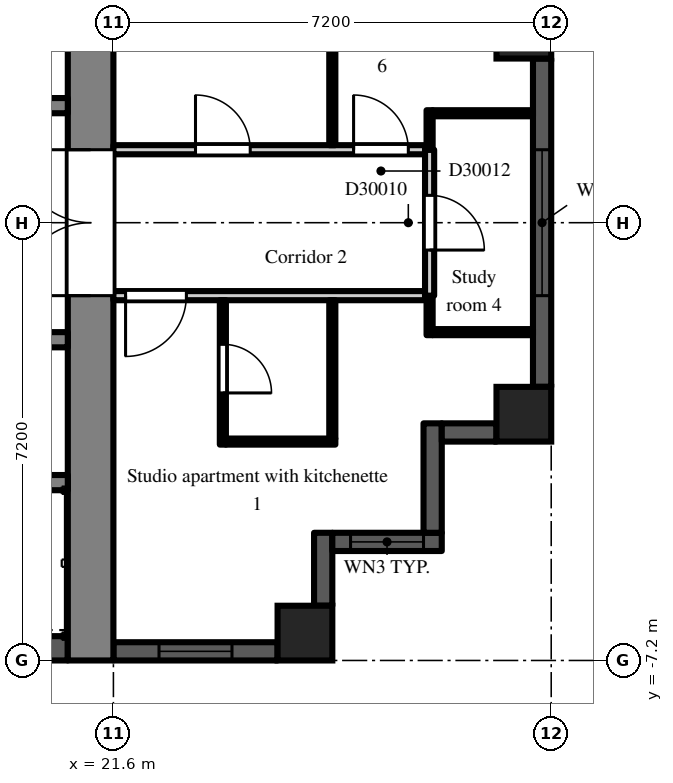
"""IFC4 building model, lengths in metres.
Left out: names, types, materials, properties, quantities, classifications, styles, units other than length and angle.
Written with IfcOpenShell. Run it as: python <this file> out.ifc"""

import sys

from ifc_helpers import new_model, si_unit, direction, frame, frame_2d, origin, origin_2d, place, context, subcontext, project, spatial, rectangle, extrude, element, fill, save


model = new_model("IFC4")
c1 = context("Model", 3, precision=1e-05, world=origin(), true_north=direction((0.0, 1.0)))
c2 = subcontext(c1, "Body", "Model", "MODEL_VIEW")
j1 = project(units=[si_unit("LENGTHUNIT", "METRE"), si_unit("PLANEANGLEUNIT", "RADIAN")], contexts=[c1])
p1 = place(None, origin())
s1 = spatial("IfcSite", under=j1, at=p1, CompositionType="ELEMENT")
p2 = place(p1, origin())
s2 = spatial("IfcBuilding", under=s1, at=p2, CompositionType="ELEMENT")
p3 = place(p2, frame((0.0, 0.0, 207.9)))
s3 = spatial("IfcBuildingStorey", under=s2, at=p3, CompositionType="ELEMENT", Elevation=207.9)
for number, where, z_axis, x_axis in (
    (1, (24.75, -6.75, 0.0), (0.0, 0.0, 1.0), (1.0, 0.0, 0.0)),
    (2, (28.35, -3.15, 0.0), (0.0, 0.0, 1.0), (1.0, 0.0, 0.0)),
    (3, (28.35, 3.15, 0.0), (0.0, 0.0, 1.0), (1.0, 0.0, 0.0)),
):
    element("IfcColumn", number, at=place(p3, frame(where, z_axis=z_axis, x_axis=x_axis)), inside=s3, PredefinedType="COLUMN", context=c2, shape_type="SweptSolid", body=[
        extrude(rectangle(XDim=0.9, YDim=0.9, at=origin_2d()), origin(), (0.0, 0.0, 1.0), 3.0),
    ])
p4 = place(p3, frame((21.6, -7.05, 0.0), z_axis=(0.0, 0.0, 1.0), x_axis=(1.0, 0.0, 0.0)))
e4 = element("IfcWall", 4, at=p4, inside=s3, PredefinedType="SOLIDWALL", context=c2, shape_type="SweptSolid", body=[
    extrude(rectangle(XDim=2.7, YDim=0.3, at=frame_2d((1.35, 0.0))), origin(), (0.0, 0.0, 1.0), 2.3),
])
p5 = place(p4, frame((0.75, 0.0, 0.2)))
e5 = element("IfcOpeningElement", 5, at=p5, cuts=e4, PredefinedType="OPENING", context=c2, shape_type="SweptSolid", body=[
    extrude(rectangle(XDim=1.2, YDim=1.85, at=frame_2d((0.6, 0.925))), frame((0.0, 0.16, 0.0), z_axis=(0.0, -1.0, 0.0), x_axis=(1.0, 0.0, 0.0)), (0.0, 0.0, 1.0), 0.32),
])
p6 = place(p3, frame((25.05, -6.3, 0.0), z_axis=(0.0, 0.0, 1.0), x_axis=(0.0, 1.0, 0.0)))
e6 = element("IfcWall", 6, at=p6, inside=s3, PredefinedType="SOLIDWALL", context=c2, shape_type="SweptSolid", body=[
    extrude(rectangle(XDim=1.2, YDim=0.3, at=frame_2d((0.6, 0.0))), origin(), (0.0, 0.0, 1.0), 2.6),
])
p7 = place(p3, frame((25.2, -5.25, 0.0), z_axis=(0.0, 0.0, 1.0), x_axis=(1.0, 0.0, 0.0)))
e7 = element("IfcWall", 7, at=p7, inside=s3, PredefinedType="SOLIDWALL", context=c2, shape_type="SweptSolid", body=[
    extrude(rectangle(XDim=1.8, YDim=0.3, at=frame_2d((0.9, 0.0))), origin(), (0.0, 0.0, 1.0), 2.6),
])
p8 = place(p7, frame((0.3, 0.0, 0.2)))
e8 = element("IfcOpeningElement", 8, at=p8, cuts=e7, PredefinedType="OPENING", context=c2, shape_type="SweptSolid", body=[
    extrude(rectangle(XDim=1.2, YDim=1.85, at=frame_2d((0.6, 0.925))), frame((0.0, 0.16, 0.0), z_axis=(0.0, -1.0, 0.0), x_axis=(1.0, 0.0, 0.0)), (0.0, 0.0, 1.0), 0.32),
])
p9 = place(p3, frame((26.85, -5.1, 0.0), z_axis=(0.0, 0.0, 1.0), x_axis=(0.0, 1.0, 0.0)))
e9 = element("IfcWall", 9, at=p9, inside=s3, PredefinedType="SOLIDWALL", context=c2, shape_type="SweptSolid", body=[
    extrude(rectangle(XDim=1.8, YDim=0.3, at=frame_2d((0.9, 0.0))), origin(), (0.0, 0.0, 1.0), 2.6),
])
p10 = place(p3, frame((27.0, -3.45, 0.0), z_axis=(0.0, 0.0, 1.0), x_axis=(1.0, 0.0, 0.0)))
e10 = element("IfcWall", 10, at=p10, inside=s3, PredefinedType="SOLIDWALL", context=c2, shape_type="SweptSolid", body=[
    extrude(rectangle(XDim=0.9, YDim=0.3, at=frame_2d((0.45, 0.0))), origin(), (0.0, 0.0, 1.0), 2.6),
])
p11 = place(p3, frame((28.65, -2.7, 0.0), z_axis=(0.0, 0.0, 1.0), x_axis=(0.0, 1.0, 0.0)))
e11 = element("IfcWall", 11, at=p11, inside=s3, PredefinedType="SOLIDWALL", context=c2, shape_type="SweptSolid", body=[
    extrude(rectangle(XDim=5.4, YDim=0.3, at=frame_2d((2.7, 0.0))), origin(), (0.0, 0.0, 1.0), 2.3),
])
p12 = place(p11, frame((1.5, 0.0, 0.2)))
e12 = element("IfcOpeningElement", 12, at=p12, cuts=e11, PredefinedType="OPENING", context=c2, shape_type="SweptSolid", body=[
    extrude(rectangle(XDim=2.4, YDim=1.85, at=frame_2d((1.2, 0.925))), frame((0.0, 0.16, 0.0), z_axis=(0.0, -1.0, 0.0), x_axis=(1.0, 0.0, 0.0)), (0.0, 0.0, 1.0), 0.32),
])
p13 = place(p3, frame((21.225, -7.2, 0.0), z_axis=(0.0, 0.0, 1.0), x_axis=(0.0, 1.0, 0.0)))
e13 = element("IfcWall", 13, at=p13, inside=s3, PredefinedType="SHEAR", context=c2, shape_type="SweptSolid", body=[
    extrude(rectangle(XDim=14.4, YDim=0.75, at=frame_2d((7.2, 0.0))), origin(), (0.0, 0.0, 1.0), 2.6),
])
p14 = place(p13, frame((6.0, 0.0, 0.0)))
e14 = element("IfcOpeningElement", 14, at=p14, cuts=e13, PredefinedType="OPENING", context=c2, shape_type="SweptSolid", body=[
    extrude(rectangle(XDim=2.4, YDim=2.2, at=frame_2d((1.2, 1.1))), frame((0.0, 0.385, 0.0), z_axis=(0.0, -1.0, 0.0), x_axis=(1.0, 0.0, 0.0)), (0.0, 0.0, 1.0), 0.77),
])
p15 = place(p3, frame((7.9, 1.925, 0.0), z_axis=(0.0, 0.0, 1.0), x_axis=(1.0, 0.0, 0.0)))
e15 = element("IfcWall", 15, at=p15, inside=s3, PredefinedType="SHEAR", context=c2, shape_type="SweptSolid", body=[
    extrude(rectangle(XDim=12.95, YDim=0.25, at=frame_2d((6.475, 0.0))), origin(), (0.0, 0.0, 1.0), 2.6),
])
p16 = place(p15, frame((4.825, 0.0, 0.0)))
e16 = element("IfcOpeningElement", 16, at=p16, cuts=e15, PredefinedType="OPENING", context=c2, shape_type="SweptSolid", body=[
    extrude(rectangle(XDim=1.1, YDim=2.1, at=frame_2d((0.55, 1.05))), frame((0.0, 0.135, 0.0), z_axis=(0.0, -1.0, 0.0), x_axis=(1.0, 0.0, 0.0)), (0.0, 0.0, 1.0), 0.27),
])
p17 = place(p15, frame((7.025, 0.0, 0.0)))
e17 = element("IfcOpeningElement", 17, at=p17, cuts=e15, PredefinedType="OPENING", context=c2, shape_type="SweptSolid", body=[
    extrude(rectangle(XDim=1.1, YDim=2.1, at=frame_2d((0.55, 1.05))), frame((0.0, 0.135, 0.0), z_axis=(0.0, -1.0, 0.0), x_axis=(1.0, 0.0, 0.0)), (0.0, 0.0, 1.0), 0.27),
])
p18 = place(p15, frame((9.225, 0.0, 0.0)))
e18 = element("IfcOpeningElement", 18, at=p18, cuts=e15, PredefinedType="OPENING", context=c2, shape_type="SweptSolid", body=[
    extrude(rectangle(XDim=1.1, YDim=2.1, at=frame_2d((0.55, 1.05))), frame((0.0, 0.135, 0.0), z_axis=(0.0, -1.0, 0.0), x_axis=(1.0, 0.0, 0.0)), (0.0, 0.0, 1.0), 0.27),
])
p19 = place(p15, frame((0.525, 0.0, 0.0)))
e19 = element("IfcOpeningElement", 19, at=p19, cuts=e15, PredefinedType="OPENING", context=c2, shape_type="SweptSolid", body=[
    extrude(rectangle(XDim=0.9, YDim=2.1, at=frame_2d((0.45, 1.05))), frame((0.0, 0.135, 0.0), z_axis=(0.0, -1.0, 0.0), x_axis=(1.0, 0.0, 0.0)), (0.0, 0.0, 1.0), 0.27),
])
p20 = place(p15, frame((2.625, 0.0, 0.0)))
e20 = element("IfcOpeningElement", 20, at=p20, cuts=e15, PredefinedType="OPENING", context=c2, shape_type="SweptSolid", body=[
    extrude(rectangle(XDim=1.1, YDim=2.1, at=frame_2d((0.55, 1.05))), frame((0.0, 0.135, 0.0), z_axis=(0.0, -1.0, 0.0), x_axis=(1.0, 0.0, 0.0)), (0.0, 0.0, 1.0), 0.27),
])
p21 = place(p15, frame((11.525, 0.0, 0.0)))
e21 = element("IfcOpeningElement", 21, at=p21, cuts=e15, PredefinedType="OPENING", context=c2, shape_type="SweptSolid", body=[
    extrude(rectangle(XDim=0.9, YDim=2.1, at=frame_2d((0.45, 1.05))), frame((0.0, 0.135, 0.0), z_axis=(0.0, -1.0, 0.0), x_axis=(1.0, 0.0, 0.0)), (0.0, 0.0, 1.0), 0.27),
])
p22 = place(p3, frame((7.9, -7.0, 0.0), z_axis=(0.0, 0.0, 1.0), x_axis=(1.0, 0.0, 0.0)))
e22 = element("IfcWall", 22, at=p22, inside=s3, PredefinedType="SHEAR", context=c2, shape_type="SweptSolid", body=[
    extrude(rectangle(XDim=12.95, YDim=0.4, at=frame_2d((6.475, 0.0))), origin(), (0.0, 0.0, 1.0), 2.6),
])
p23 = place(p3, frame((7.9, -1.925, 0.0), z_axis=(0.0, 0.0, 1.0), x_axis=(1.0, 0.0, 0.0)))
e23 = element("IfcWall", 23, at=p23, inside=s3, PredefinedType="SHEAR", context=c2, shape_type="SweptSolid", body=[
    extrude(rectangle(XDim=12.95, YDim=0.25, at=frame_2d((6.475, 0.0))), origin(), (0.0, 0.0, 1.0), 2.6),
])
p24 = place(p23, frame((0.525, 0.0, 0.0)))
e24 = element("IfcOpeningElement", 24, at=p24, cuts=e23, PredefinedType="OPENING", context=c2, shape_type="SweptSolid", body=[
    extrude(rectangle(XDim=0.9, YDim=2.1, at=frame_2d((0.45, 1.05))), frame((0.0, 0.135, 0.0), z_axis=(0.0, -1.0, 0.0), x_axis=(1.0, 0.0, 0.0)), (0.0, 0.0, 1.0), 0.27),
])
p25 = place(p23, frame((2.625, 0.0, 0.0)))
e25 = element("IfcOpeningElement", 25, at=p25, cuts=e23, PredefinedType="OPENING", context=c2, shape_type="SweptSolid", body=[
    extrude(rectangle(XDim=1.1, YDim=2.1, at=frame_2d((0.55, 1.05))), frame((0.0, 0.135, 0.0), z_axis=(0.0, -1.0, 0.0), x_axis=(1.0, 0.0, 0.0)), (0.0, 0.0, 1.0), 0.27),
])
p26 = place(p23, frame((4.925, 0.0, 0.0)))
e26 = element("IfcOpeningElement", 26, at=p26, cuts=e23, PredefinedType="OPENING", context=c2, shape_type="SweptSolid", body=[
    extrude(rectangle(XDim=0.9, YDim=2.1, at=frame_2d((0.45, 1.05))), frame((0.0, 0.135, 0.0), z_axis=(0.0, -1.0, 0.0), x_axis=(1.0, 0.0, 0.0)), (0.0, 0.0, 1.0), 0.27),
])
p27 = place(p23, frame((8.225, 0.0, 0.0)))
e27 = element("IfcOpeningElement", 27, at=p27, cuts=e23, PredefinedType="OPENING", context=c2, shape_type="SweptSolid", body=[
    extrude(rectangle(XDim=0.9, YDim=2.1, at=frame_2d((0.45, 1.05))), frame((0.0, 0.135, 0.0), z_axis=(0.0, -1.0, 0.0), x_axis=(1.0, 0.0, 0.0)), (0.0, 0.0, 1.0), 0.27),
])
p28 = place(p23, frame((11.525, 0.0, 0.0)))
e28 = element("IfcOpeningElement", 28, at=p28, cuts=e23, PredefinedType="OPENING", context=c2, shape_type="SweptSolid", body=[
    extrude(rectangle(XDim=0.9, YDim=2.1, at=frame_2d((0.45, 1.05))), frame((0.0, 0.135, 0.0), z_axis=(0.0, -1.0, 0.0), x_axis=(1.0, 0.0, 0.0)), (0.0, 0.0, 1.0), 0.27),
])
p29 = place(p3, frame((12.3, -4.275, 0.0), z_axis=(0.0, 0.0, 1.0), x_axis=(1.0, 0.0, 0.0)))
e29 = element("IfcWall", 29, at=p29, inside=s3, PredefinedType="SHEAR", context=c2, shape_type="SweptSolid", body=[
    extrude(rectangle(XDim=8.55, YDim=0.25, at=frame_2d((4.275, 0.0))), origin(), (0.0, 0.0, 1.0), 2.6),
])
p30 = place(p3, frame((21.6, -1.2, 0.0), z_axis=(0.0, 0.0, 1.0), x_axis=(1.0, 0.0, 0.0)))
e30 = element("IfcWall", 30, at=p30, inside=s3, PredefinedType="PARTITIONING", context=c2, shape_type="SweptSolid", body=[
    extrude(rectangle(XDim=5.125, YDim=0.15, at=frame_2d((2.562, 0.0))), origin(), (0.0, 0.0, 1.0), 2.6),
])
p31 = place(p30, frame((0.2, 0.0, 0.0)))
e31 = element("IfcOpeningElement", 31, at=p31, cuts=e30, PredefinedType="OPENING", context=c2, shape_type="SweptSolid", body=[
    extrude(rectangle(XDim=1.0, YDim=2.1, at=frame_2d((0.5, 1.05))), frame((0.0, 0.085, 0.0), z_axis=(0.0, -1.0, 0.0), x_axis=(1.0, 0.0, 0.0)), (0.0, 0.0, 1.0), 0.17),
])
p32 = place(p3, frame((21.6, 1.2, 0.0), z_axis=(0.0, 0.0, 1.0), x_axis=(1.0, 0.0, 0.0)))
e32 = element("IfcWall", 32, at=p32, inside=s3, PredefinedType="PARTITIONING", context=c2, shape_type="SweptSolid", body=[
    extrude(rectangle(XDim=5.125, YDim=0.15, at=frame_2d((2.562, 0.0))), origin(), (0.0, 0.0, 1.0), 2.6),
])
p33 = place(p32, frame((1.35, 0.0, 0.0)))
e33 = element("IfcOpeningElement", 33, at=p33, cuts=e32, PredefinedType="OPENING", context=c2, shape_type="SweptSolid", body=[
    extrude(rectangle(XDim=0.9, YDim=2.1, at=frame_2d((0.45, 1.05))), frame((0.0, 0.085, 0.0), z_axis=(0.0, -1.0, 0.0), x_axis=(1.0, 0.0, 0.0)), (0.0, 0.0, 1.0), 0.17),
])
p34 = place(p32, frame((3.95, 0.0, 0.0)))
e34 = element("IfcOpeningElement", 34, at=p34, cuts=e32, PredefinedType="OPENING", context=c2, shape_type="SweptSolid", body=[
    extrude(rectangle(XDim=0.9, YDim=2.1, at=frame_2d((0.45, 1.05))), frame((0.0, 0.085, 0.0), z_axis=(0.0, -1.0, 0.0), x_axis=(1.0, 0.0, 0.0)), (0.0, 0.0, 1.0), 0.17),
])
p35 = place(p3, frame((23.4, -3.65, 0.0), z_axis=(0.0, 0.0, 1.0), x_axis=(0.0, 1.0, 0.0)))
e35 = element("IfcWall", 35, at=p35, inside=s3, PredefinedType="PARTITIONING", context=c2, shape_type="SweptSolid", body=[
    extrude(rectangle(XDim=2.375, YDim=0.1, at=frame_2d((1.188, 0.0))), origin(), (0.0, 0.0, 1.0), 2.6),
])
p36 = place(p35, frame((0.85, 0.0, 0.0)))
e36 = element("IfcOpeningElement", 36, at=p36, cuts=e35, PredefinedType="OPENING", context=c2, shape_type="SweptSolid", body=[
    extrude(rectangle(XDim=0.8, YDim=2.1, at=frame_2d((0.4, 1.05))), frame((0.0, 0.06, 0.0), z_axis=(0.0, -1.0, 0.0), x_axis=(1.0, 0.0, 0.0)), (0.0, 0.0, 1.0), 0.12),
])
p37 = place(p3, frame((23.45, -3.6, 0.0), z_axis=(0.0, 0.0, 1.0), x_axis=(1.0, 0.0, 0.0)))
e37 = element("IfcWall", 37, at=p37, inside=s3, PredefinedType="PARTITIONING", context=c2, shape_type="SweptSolid", body=[
    extrude(rectangle(XDim=1.8, YDim=0.1, at=frame_2d((0.9, 0.0))), origin(), (0.0, 0.0, 1.0), 2.6),
])
p38 = place(p3, frame((25.2, -3.55, 0.0), z_axis=(0.0, 0.0, 1.0), x_axis=(0.0, 1.0, 0.0)))
e38 = element("IfcWall", 38, at=p38, inside=s3, PredefinedType="PARTITIONING", context=c2, shape_type="SweptSolid", body=[
    extrude(rectangle(XDim=2.275, YDim=0.1, at=frame_2d((1.138, 0.0))), origin(), (0.0, 0.0, 1.0), 2.6),
])
p39 = place(p3, frame((25.2, 1.275, 0.0), z_axis=(0.0, 0.0, 1.0), x_axis=(0.0, 1.0, 0.0)))
e39 = element("IfcWall", 39, at=p39, inside=s3, PredefinedType="PARTITIONING", context=c2, shape_type="SweptSolid", body=[
    extrude(rectangle(XDim=3.825, YDim=0.1, at=frame_2d((1.913, 0.0))), origin(), (0.0, 0.0, 1.0), 2.6),
])
p40 = place(p3, frame((26.8, -1.85, 0.0), z_axis=(0.0, 0.0, 1.0), x_axis=(0.0, 1.0, 0.0)))
e40 = element("IfcWall", 40, at=p40, inside=s3, PredefinedType="PARTITIONING", context=c2, shape_type="SweptSolid", body=[
    extrude(rectangle(XDim=0.65, YDim=0.1, at=frame_2d((0.325, 0.0))), origin(), (0.0, 0.0, 1.0), 2.6),
])
p41 = place(p3, frame((26.85, -1.8, 0.0), z_axis=(0.0, 0.0, 1.0), x_axis=(1.0, 0.0, 0.0)))
e41 = element("IfcWall", 41, at=p41, inside=s3, PredefinedType="PARTITIONING", context=c2, shape_type="SweptSolid", body=[
    extrude(rectangle(XDim=1.65, YDim=0.1, at=frame_2d((0.825, 0.0))), origin(), (0.0, 0.0, 1.0), 2.6),
])
p42 = place(p3, frame((26.8, -1.2, 0.0), z_axis=(0.0, 0.0, 1.0), x_axis=(0.0, 1.0, 0.0)))
e42 = element("IfcWall", 42, at=p42, inside=s3, PredefinedType="PARTITIONING", context=c2, shape_type="SweptSolid", body=[
    extrude(rectangle(XDim=2.4, YDim=0.15, at=frame_2d((1.2, 0.0))), origin(), (0.0, 0.0, 1.0), 2.6),
])
p43 = place(p42, frame((0.75, 0.0, 0.0)))
e43 = element("IfcOpeningElement", 43, at=p43, cuts=e42, PredefinedType="OPENING", context=c2, shape_type="SweptSolid", body=[
    extrude(rectangle(XDim=0.9, YDim=2.1, at=frame_2d((0.45, 1.05))), frame((0.0, 0.085, 0.0), z_axis=(0.0, -1.0, 0.0), x_axis=(1.0, 0.0, 0.0)), (0.0, 0.0, 1.0), 0.17),
])
p44 = place(p3, frame((26.8, 1.2, 0.0), z_axis=(0.0, 0.0, 1.0), x_axis=(0.0, 1.0, 0.0)))
e44 = element("IfcWall", 44, at=p44, inside=s3, PredefinedType="PARTITIONING", context=c2, shape_type="SweptSolid", body=[
    extrude(rectangle(XDim=0.65, YDim=0.1, at=frame_2d((0.325, 0.0))), origin(), (0.0, 0.0, 1.0), 2.6),
])
p45 = place(p3, frame((26.85, 1.8, 0.0), z_axis=(0.0, 0.0, 1.0), x_axis=(1.0, 0.0, 0.0)))
e45 = element("IfcWall", 45, at=p45, inside=s3, PredefinedType="PARTITIONING", context=c2, shape_type="SweptSolid", body=[
    extrude(rectangle(XDim=1.65, YDim=0.1, at=frame_2d((0.825, 0.0))), origin(), (0.0, 0.0, 1.0), 2.6),
])
p46 = place(p5, origin())
e46 = element("IfcWindow", 46, at=p46, inside=s3, PartitioningType="SINGLE_PANEL", PredefinedType="WINDOW", context=c2, shape_type="SweptSolid", body=[
    extrude(rectangle(XDim=1.2, YDim=1.85, at=frame_2d((0.6, 0.925))), frame((0.0, 0.03, 0.0), z_axis=(0.0, -1.0, 0.0), x_axis=(1.0, 0.0, 0.0)), (0.0, 0.0, 1.0), 0.06),
])
fill(e5, e46)
p47 = place(p8, origin())
e47 = element("IfcWindow", 47, at=p47, inside=s3, PartitioningType="SINGLE_PANEL", PredefinedType="WINDOW", context=c2, shape_type="SweptSolid", body=[
    extrude(rectangle(XDim=1.2, YDim=1.85, at=frame_2d((0.6, 0.925))), frame((0.0, 0.03, 0.0), z_axis=(0.0, -1.0, 0.0), x_axis=(1.0, 0.0, 0.0)), (0.0, 0.0, 1.0), 0.06),
])
fill(e8, e47)
p48 = place(p12, origin())
e48 = element("IfcWindow", 48, at=p48, inside=s3, PartitioningType="SINGLE_PANEL", PredefinedType="WINDOW", context=c2, shape_type="SweptSolid", body=[
    extrude(rectangle(XDim=2.4, YDim=1.85, at=frame_2d((1.2, 0.925))), frame((0.0, 0.03, 0.0), z_axis=(0.0, -1.0, 0.0), x_axis=(1.0, 0.0, 0.0)), (0.0, 0.0, 1.0), 0.06),
])
fill(e12, e48)
p49 = place(p14, origin())
e49 = element("IfcDoor", 49, at=p49, inside=s3, OperationType="DOUBLE_DOOR_DOUBLE_SWING", PredefinedType="DOOR", context=c2, shape_type="SweptSolid", body=[
    extrude(rectangle(XDim=2.4, YDim=2.2, at=frame_2d((1.2, 1.1))), frame((0.0, 0.025, 0.0), z_axis=(0.0, -1.0, 0.0), x_axis=(1.0, 0.0, 0.0)), (0.0, 0.0, 1.0), 0.05),
])
fill(e14, e49)
p50 = place(p43, frame((0.9, 0.0, 0.0), z_axis=(0.0, 0.0, 1.0), x_axis=(-1.0, 0.0, 0.0)))
e50 = element("IfcDoor", 50, at=p50, inside=s3, OperationType="SINGLE_SWING_RIGHT", PredefinedType="DOOR", context=c2, shape_type="SweptSolid", body=[
    extrude(rectangle(XDim=0.9, YDim=2.1, at=frame_2d((0.45, 1.05))), frame((0.0, 0.025, 0.0), z_axis=(0.0, -1.0, 0.0), x_axis=(1.0, 0.0, 0.0)), (0.0, 0.0, 1.0), 0.05),
])
fill(e43, e50)
p51 = place(p33, origin())
e51 = element("IfcDoor", 51, at=p51, inside=s3, OperationType="SINGLE_SWING_LEFT", PredefinedType="DOOR", context=c2, shape_type="SweptSolid", body=[
    extrude(rectangle(XDim=0.9, YDim=2.1, at=frame_2d((0.45, 1.05))), frame((0.0, 0.025, 0.0), z_axis=(0.0, -1.0, 0.0), x_axis=(1.0, 0.0, 0.0)), (0.0, 0.0, 1.0), 0.05),
])
fill(e33, e51)
p52 = place(p34, origin())
e52 = element("IfcDoor", 52, at=p52, inside=s3, OperationType="SINGLE_SWING_LEFT", PredefinedType="DOOR", context=c2, shape_type="SweptSolid", body=[
    extrude(rectangle(XDim=0.9, YDim=2.1, at=frame_2d((0.45, 1.05))), frame((0.0, 0.025, 0.0), z_axis=(0.0, -1.0, 0.0), x_axis=(1.0, 0.0, 0.0)), (0.0, 0.0, 1.0), 0.05),
])
fill(e34, e52)
p53 = place(p36, frame((0.8, 0.0, 0.0), z_axis=(0.0, 0.0, 1.0), x_axis=(-1.0, 0.0, 0.0)))
e53 = element("IfcDoor", 53, at=p53, inside=s3, OperationType="SINGLE_SWING_RIGHT", PredefinedType="DOOR", context=c2, shape_type="SweptSolid", body=[
    extrude(rectangle(XDim=0.8, YDim=2.1, at=frame_2d((0.4, 1.05))), frame((0.0, 0.025, 0.0), z_axis=(0.0, -1.0, 0.0), x_axis=(1.0, 0.0, 0.0)), (0.0, 0.0, 1.0), 0.05),
])
fill(e36, e53)
p54 = place(p31, frame((1.0, 0.0, 0.0), z_axis=(0.0, 0.0, 1.0), x_axis=(-1.0, 0.0, 0.0)))
e54 = element("IfcDoor", 54, at=p54, inside=s3, OperationType="SINGLE_SWING_RIGHT", PredefinedType="DOOR", context=c2, shape_type="SweptSolid", body=[
    extrude(rectangle(XDim=1.0, YDim=2.1, at=frame_2d((0.5, 1.05))), frame((0.0, 0.025, 0.0), z_axis=(0.0, -1.0, 0.0), x_axis=(1.0, 0.0, 0.0)), (0.0, 0.0, 1.0), 0.05),
])
fill(e31, e54)
save(model, sys.argv[1])
